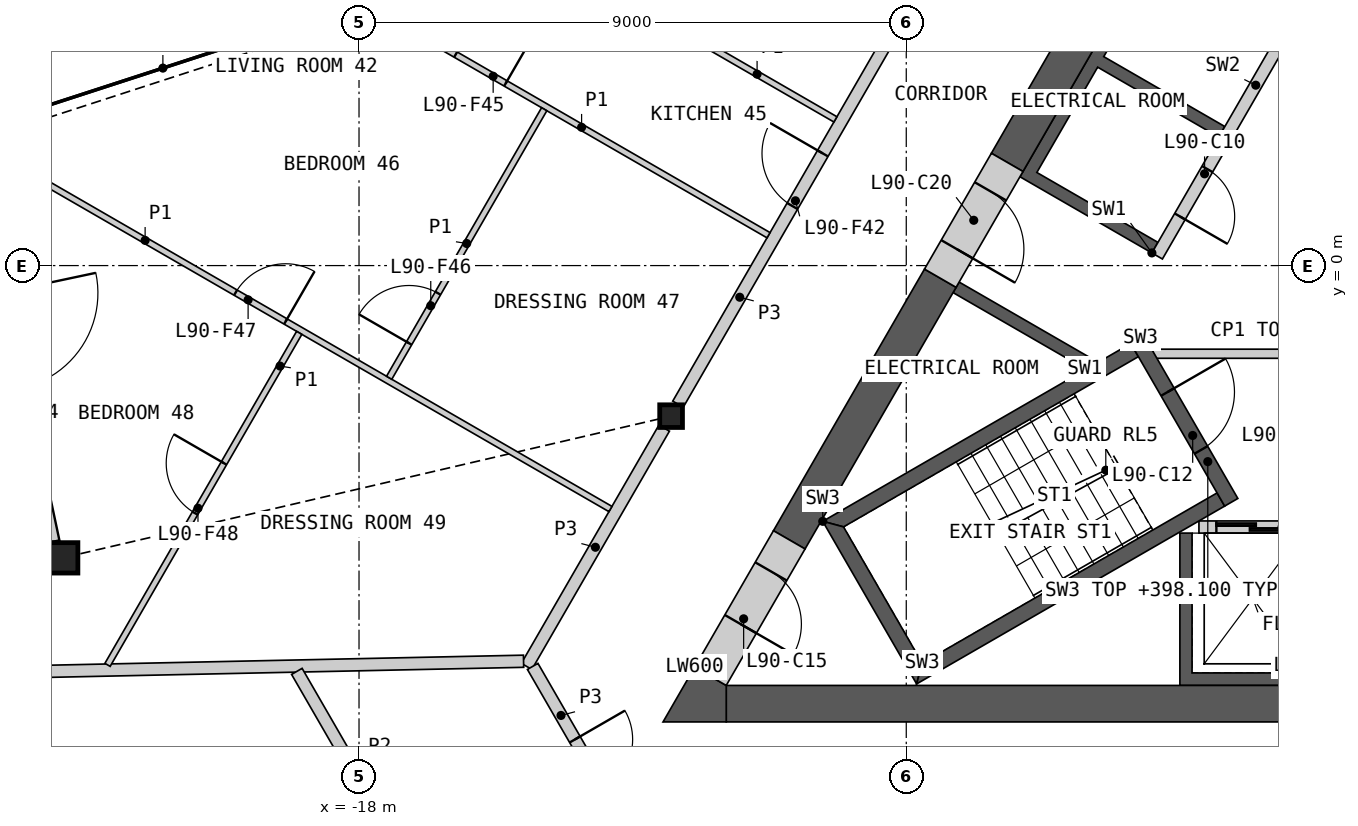
"""IFC4 building model, lengths in metres.
Left out: names, types, materials, properties, quantities, classifications, styles, units other than length and angle.
Written with IfcOpenShell. Run it as: python <this file> out.ifc"""

import sys

from ifc_helpers import new_model, si_unit, direction, frame, frame_2d, origin, origin_2d, place, context, subcontext, project, spatial, polyline, rectangle, hollow_rectangle, i_section, outline, extrude, element, fill, save


model = new_model("IFC4")
c1 = context("Model", 3, precision=1e-05, world=origin(), true_north=direction((0.0, 1.0)))
c2 = subcontext(c1, "Body", "Model", "MODEL_VIEW")
j1 = project(units=[si_unit("LENGTHUNIT", "METRE"), si_unit("PLANEANGLEUNIT", "RADIAN")], contexts=[c1])
p1 = place(None, origin())
s1 = spatial("IfcSite", under=j1, at=p1, CompositionType="ELEMENT")
p2 = place(p1, origin())
s2 = spatial("IfcBuilding", under=s1, at=p2, CompositionType="ELEMENT")
p3 = place(p2, frame((0.0, 0.0, 395.0)))
s3 = spatial("IfcBuildingStorey", under=s2, at=p3, CompositionType="ELEMENT", Elevation=395.0)
p4 = place(p3, frame((-22.874, -4.807, 0.0), z_axis=(0.0, 0.0, 1.0), x_axis=(1.0, 0.0, 0.0)))
e1 = element("IfcColumn", 1, at=p4, inside=s3, PredefinedType="COLUMN", context=c2, shape_type="SweptSolid", body=[
    extrude(hollow_rectangle(XDim=0.5, YDim=0.5, WallThickness=0.03, at=origin_2d()), origin(), (0.0, 0.0, 1.0), 3.4),
])
p5 = place(p3, frame((-12.868, -2.476, 0.0), z_axis=(0.0, 0.0, 1.0), x_axis=(1.0, 0.0, 0.0)))
e2 = element("IfcColumn", 2, at=p5, inside=s3, PredefinedType="COLUMN", context=c2, shape_type="SweptSolid", body=[
    extrude(i_section(OverallWidth=0.374, OverallDepth=0.372, WebThickness=0.016, FlangeThickness=0.026, at=origin_2d()), origin(), (0.0, 0.0, 1.0), 3.4),
])
p6 = place(p3, frame((-24.379, 1.83, 0.0), z_axis=(0.0, 0.0, 1.0), x_axis=(0.207910765171, -0.978147797486, 0.0)))
e3 = element("IfcWall", 3, at=p6, inside=s3, PredefinedType="SOLIDWALL", context=c2, shape_type="SweptSolid", body=[
    extrude(rectangle(XDim=6.512, YDim=0.2, at=frame_2d((3.256, 0.0))), origin(), (0.0, 0.0, 1.0), 2.634),
])
p7 = place(p6, frame((2.333, 0.0, 0.0)))
e4 = element("IfcOpeningElement", 4, at=p7, cuts=e3, PredefinedType="OPENING", context=c2, shape_type="SweptSolid", body=[
    extrude(rectangle(XDim=1.6, YDim=2.25, at=frame_2d((0.8, 1.125))), frame((0.0, 0.11, 0.0), z_axis=(0.0, -1.0, 0.0), x_axis=(1.0, 0.0, 0.0)), (0.0, 0.0, 1.0), 0.22),
])
p8 = place(p3, origin())
e5 = element("IfcWall", 5, at=p8, inside=s3, PredefinedType="SHEAR", context=c2, shape_type="SweptSolid", body=[
    extrude(outline(polyline([(4.5, -4.4), (4.5, -6.906), (-4.5, -6.906), (-4.5, -4.4), (-4.3, -4.4), (-4.3, -6.7), (-2.3, -6.7), (-2.3, -4.4), (-2.1, -4.4), (-2.1, -6.7), (-0.1, -6.7), (-0.1, -4.4), (0.1, -4.4), (0.1, -6.7), (2.1, -6.7), (2.1, -4.4), (2.3, -4.4), (2.3, -6.7), (4.3, -6.7), (4.3, -4.4), (4.5, -4.4)])), origin(), (0.0, 0.0, 1.0), 3.1),
])
p9 = place(p3, frame((-4.187, -4.3, 0.0), z_axis=(0.0, 0.0, 1.0), x_axis=(1.0, 0.0, 0.0)))
e6 = element("IfcWall", 6, at=p9, inside=s3, PredefinedType="SOLIDWALL", context=c2, shape_type="SweptSolid", body=[
    extrude(rectangle(XDim=8.373, YDim=0.2, at=frame_2d((4.187, 0.0))), origin(), (0.0, 0.0, 1.0), 3.1),
])
p10 = place(p9, frame((0.287, 0.0, 0.0)))
e7 = element("IfcOpeningElement", 7, at=p10, cuts=e6, PredefinedType="OPENING", context=c2, shape_type="SweptSolid", body=[
    extrude(rectangle(XDim=1.2, YDim=2.1, at=frame_2d((0.6, 1.05))), frame((0.0, 0.11, 0.0), z_axis=(0.0, -1.0, 0.0), x_axis=(1.0, 0.0, 0.0)), (0.0, 0.0, 1.0), 0.22),
])
p11 = place(p9, frame((2.387, 0.0, 0.0)))
e8 = element("IfcOpeningElement", 8, at=p11, cuts=e6, PredefinedType="OPENING", context=c2, shape_type="SweptSolid", body=[
    extrude(rectangle(XDim=1.4, YDim=2.1, at=frame_2d((0.7, 1.05))), frame((0.0, 0.11, 0.0), z_axis=(0.0, -1.0, 0.0), x_axis=(1.0, 0.0, 0.0)), (0.0, 0.0, 1.0), 0.22),
])
p12 = place(p9, frame((4.737, 0.0, 0.0)))
e9 = element("IfcOpeningElement", 9, at=p12, cuts=e6, PredefinedType="OPENING", context=c2, shape_type="SweptSolid", body=[
    extrude(rectangle(XDim=1.1, YDim=2.1, at=frame_2d((0.55, 1.05))), frame((0.0, 0.11, 0.0), z_axis=(0.0, -1.0, 0.0), x_axis=(1.0, 0.0, 0.0)), (0.0, 0.0, 1.0), 0.22),
])
p13 = place(p9, frame((6.887, 0.0, 0.0)))
e10 = element("IfcOpeningElement", 10, at=p13, cuts=e6, PredefinedType="OPENING", context=c2, shape_type="SweptSolid", body=[
    extrude(rectangle(XDim=1.2, YDim=2.1, at=frame_2d((0.6, 1.05))), frame((0.0, 0.11, 0.0), z_axis=(0.0, -1.0, 0.0), x_axis=(1.0, 0.0, 0.0)), (0.0, 0.0, 1.0), 0.22),
])
p14 = place(p3, origin())
e11 = element("IfcWall", 11, at=p14, inside=s3, PredefinedType="SHEAR", context=c2, shape_type="SweptSolid", body=[
    extrude(outline(polyline([(-6.061, -1.697), (-8.231, -0.444), (-8.131, -0.271), (-5.96, -1.524), (-6.061, -1.697)])), origin(), (0.0, 0.0, 1.0), 3.1),
])
p15 = place(p3, origin())
e12 = element("IfcWall", 12, at=p15, inside=s3, PredefinedType="SHEAR", context=c2, shape_type="SweptSolid", body=[
    extrude(outline(polyline([(-4.96, 0.208), (-7.131, 1.461), (-3.731, 7.35), (-1.561, 6.097), (-1.66, 5.924), (-3.652, 7.074), (-5.752, 3.437), (-3.76, 2.287), (-3.861, 2.113), (-5.852, 3.263), (-6.852, 1.531), (-4.861, 0.381), (-4.96, 0.208)])), origin(), (0.0, 0.0, 1.0), 3.1),
])
p16 = place(p3, frame((-1.631, 5.776, 0.0), z_axis=(0.0, 0.0, 1.0), x_axis=(-0.499992876559, -0.866029516466, 0.0)))
e13 = element("IfcWall", 13, at=p16, inside=s3, PredefinedType="SOLIDWALL", context=c2, shape_type="SweptSolid", body=[
    extrude(rectangle(XDim=6.486, YDim=0.2, at=frame_2d((3.243, 0.0))), origin(), (0.0, 0.0, 1.0), 3.1),
])
p17 = place(p16, frame((1.537, 0.0, 0.0)))
e14 = element("IfcOpeningElement", 14, at=p17, cuts=e13, PredefinedType="OPENING", context=c2, shape_type="SweptSolid", body=[
    extrude(rectangle(XDim=0.9, YDim=2.1, at=frame_2d((0.45, 1.05))), frame((0.0, 0.11, 0.0), z_axis=(0.0, -1.0, 0.0), x_axis=(1.0, 0.0, 0.0)), (0.0, 0.0, 1.0), 0.22),
])
p18 = place(p16, frame((4.837, 0.0, 0.0)))
e15 = element("IfcOpeningElement", 15, at=p18, cuts=e13, PredefinedType="OPENING", context=c2, shape_type="SweptSolid", body=[
    extrude(rectangle(XDim=0.9, YDim=2.1, at=frame_2d((0.45, 1.05))), frame((0.0, 0.11, 0.0), z_axis=(0.0, -1.0, 0.0), x_axis=(1.0, 0.0, 0.0)), (0.0, 0.0, 1.0), 0.22),
])
p19 = place(p3, frame((-4.941, -1.45, 0.0), z_axis=(0.0, 0.0, 1.0), x_axis=(1.0, 0.0, 0.0)))
e16 = element("IfcWall", 16, at=p19, inside=s3, PredefinedType="PARTITIONING", context=c2, shape_type="SweptSolid", body=[
    extrude(rectangle(XDim=9.882, YDim=0.15, at=frame_2d((4.941, 0.0))), origin(), (0.0, 0.0, 1.0), 3.1),
])
p20 = place(p19, frame((4.391, 0.0, 0.0)))
e17 = element("IfcOpeningElement", 17, at=p20, cuts=e16, PredefinedType="OPENING", context=c2, shape_type="SweptSolid", body=[
    extrude(rectangle(XDim=1.1, YDim=2.1, at=frame_2d((0.55, 1.05))), frame((0.0, 0.085, 0.0), z_axis=(0.0, -1.0, 0.0), x_axis=(1.0, 0.0, 0.0)), (0.0, 0.0, 1.0), 0.17),
])
p21 = place(p3, origin())
e18 = element("IfcWall", 18, at=p21, inside=s3, PredefinedType="SHEAR", context=c2, shape_type="SweptSolid", body=[
    extrude(outline(polyline([(-5.307, -1.281), (-10.374, -4.206), (-10.032, -4.298), (-5.182, -1.498), (-5.307, -1.281)])), origin(), (0.0, 0.0, 1.0), 3.1),
])
p22 = place(p3, origin())
e19 = element("IfcWall", 19, at=p22, inside=s3, PredefinedType="SHEAR", context=c2, shape_type="SweptSolid", body=[
    extrude(outline(polyline([(-10.374, -4.206), (-8.83, -6.881), (-8.738, -6.539), (-10.032, -4.298), (-10.374, -4.206)])), origin(), (0.0, 0.0, 1.0), 3.1),
])
p23 = place(p3, origin())
e20 = element("IfcWall", 20, at=p23, inside=s3, PredefinedType="SHEAR", context=c2, shape_type="SweptSolid", body=[
    extrude(outline(polyline([(-8.738, -6.539), (-8.83, -6.881), (-3.763, -3.956), (-3.888, -3.739), (-8.738, -6.539)])), origin(), (0.0, 0.0, 1.0), 3.1),
])
p24 = place(p3, frame((-5.199, -1.219, 0.0), z_axis=(0.0, 0.0, 1.0), x_axis=(0.499982516597, -0.866035497597, 0.0)))
e21 = element("IfcWall", 21, at=p24, inside=s3, PredefinedType="SHEAR", context=c2, shape_type="SweptSolid", body=[
    extrude(rectangle(XDim=3.088, YDim=0.25, at=frame_2d((1.544, 0.0))), origin(), (0.0, 0.0, 1.0), 3.1),
])
p25 = place(p24, frame((0.994, 0.0, 0.0)))
e22 = element("IfcOpeningElement", 22, at=p25, cuts=e21, PredefinedType="OPENING", context=c2, shape_type="SweptSolid", body=[
    extrude(rectangle(XDim=1.1, YDim=2.1, at=frame_2d((0.55, 1.05))), frame((0.0, 0.135, 0.0), z_axis=(0.0, -1.0, 0.0), x_axis=(1.0, 0.0, 0.0)), (0.0, 0.0, 1.0), 0.27),
])
p26 = place(p3, frame((-11.961, -7.206, 0.0), z_axis=(0.0, 0.0, 1.0), x_axis=(1.0, 0.0, 0.0)))
e23 = element("IfcWall", 23, at=p26, inside=s3, PredefinedType="SHEAR", context=c2, shape_type="SweptSolid", body=[
    extrude(rectangle(XDim=23.921, YDim=0.6, at=frame_2d((11.961, 0.0))), origin(), (0.0, 0.0, 1.0), 3.1),
])
p27 = place(p3, frame((-3.461, 8.417, 0.0), z_axis=(0.0, 0.0, 1.0), x_axis=(-0.50000391502, -0.866023143435, 0.0)))
e24 = element("IfcWall", 24, at=p27, inside=s3, PredefinedType="SHEAR", context=c2, shape_type="SweptSolid", body=[
    extrude(rectangle(XDim=7.759, YDim=0.6, at=frame_2d((3.879, 0.0))), origin(), (0.0, 0.0, 1.0), 3.1),
])
p28 = place(p3, frame((-8.44, -0.208, 0.0), z_axis=(0.0, 0.0, 1.0), x_axis=(-0.500007425856, -0.866021116422, 0.0)))
e25 = element("IfcWall", 25, at=p28, inside=s3, PredefinedType="SHEAR", context=c2, shape_type="SweptSolid", body=[
    extrude(rectangle(XDim=4.969, YDim=0.6, at=frame_2d((2.484, 0.0))), origin(), (0.0, 0.0, 1.0), 3.1),
])
p29 = place(p3, origin())
e26 = element("IfcWall", 26, at=p29, inside=s3, PredefinedType="SHEAR", context=c2, shape_type="SweptSolid", body=[
    extrude(outline(polyline([(-12.48, -6.606), (-11.961, -6.906), (-11.961, -7.506), (-13.0, -7.506), (-12.48, -6.606)])), origin(), (0.0, 0.0, 1.0), 3.1),
])
p30 = place(p3, frame((-10.925, -4.511, 0.0), z_axis=(0.0, 0.0, 1.0), x_axis=(-0.500018667571, -0.866014625789, 0.0)))
e27 = element("IfcWall", 27, at=p30, inside=s3, PredefinedType="SHEAR", context=c2, shape_type="SweptSolid", body=[
    extrude(rectangle(XDim=2.592, YDim=0.6, at=frame_2d((1.296, 0.0))), origin(), (0.0, 0.0, 1.0), 3.1),
])
p31 = place(p30, frame((0.6, 0.0, 0.0)))
e28 = element("IfcOpeningElement", 28, at=p31, cuts=e27, PredefinedType="OPENING", context=c2, shape_type="SweptSolid", body=[
    extrude(rectangle(XDim=1.0, YDim=2.1, at=frame_2d((0.5, 1.05))), frame((0.0, 0.31, 0.0), z_axis=(0.0, -1.0, 0.0), x_axis=(1.0, 0.0, 0.0)), (0.0, 0.0, 1.0), 0.62),
])
p32 = place(p3, frame((-7.34, 1.698, 0.0), z_axis=(0.0, 0.0, 1.0), x_axis=(-0.50002983664, -0.866008176907, 0.0)))
e29 = element("IfcWall", 29, at=p32, inside=s3, PredefinedType="SHEAR", context=c2, shape_type="SweptSolid", body=[
    extrude(rectangle(XDim=2.2, YDim=0.6, at=frame_2d((1.1, 0.0))), origin(), (0.0, 0.0, 1.0), 3.1),
])
p33 = place(p32, frame((0.55, 0.0, 0.0)))
e30 = element("IfcOpeningElement", 30, at=p33, cuts=e29, PredefinedType="OPENING", context=c2, shape_type="SweptSolid", body=[
    extrude(rectangle(XDim=1.1, YDim=2.1, at=frame_2d((0.55, 1.05))), frame((0.0, 0.31, 0.0), z_axis=(0.0, -1.0, 0.0), x_axis=(1.0, 0.0, 0.0)), (0.0, 0.0, 1.0), 0.62),
])
p34 = place(p3, frame((-12.754, -2.279, 0.0), z_axis=(0.0, 0.0, 1.0), x_axis=(0.500001682468, 0.866024432409, 0.0)))
e31 = element("IfcWall", 31, at=p34, inside=s3, PredefinedType="PARTITIONING", context=c2, shape_type="SweptSolid", body=[
    extrude(rectangle(XDim=8.124, YDim=0.2, at=frame_2d((4.062, 0.0))), origin(), (0.0, 0.0, 1.0), 3.1),
])
p35 = place(p34, frame((3.762, 0.0, 0.0)))
e32 = element("IfcOpeningElement", 32, at=p35, cuts=e31, PredefinedType="OPENING", context=c2, shape_type="SweptSolid", body=[
    extrude(rectangle(XDim=1.0, YDim=2.1, at=frame_2d((0.5, 1.05))), frame((0.0, 0.11, 0.0), z_axis=(0.0, -1.0, 0.0), x_axis=(1.0, 0.0, 0.0)), (0.0, 0.0, 1.0), 0.22),
])
p36 = place(p3, frame((-15.244, -6.592, 0.0), z_axis=(0.0, 0.0, 1.0), x_axis=(0.499974648164, 0.866040040179, 0.0)))
e33 = element("IfcWall", 33, at=p36, inside=s3, PredefinedType="PARTITIONING", context=c2, shape_type="SweptSolid", body=[
    extrude(rectangle(XDim=4.525, YDim=0.2, at=frame_2d((2.263, 0.0))), origin(), (0.0, 0.0, 1.0), 3.1),
])
p37 = place(p3, frame((-15.144, -6.592, 0.0), z_axis=(0.0, 0.0, 1.0), x_axis=(0.499958791762, -0.866049194065, 0.0)))
e34 = element("IfcWall", 34, at=p37, inside=s3, PredefinedType="PARTITIONING", context=c2, shape_type="SweptSolid", body=[
    extrude(rectangle(XDim=3.726, YDim=0.2, at=frame_2d((1.863, 0.0))), origin(), (0.0, 0.0, 1.0), 3.1),
])
p38 = place(p37, frame((1.388, 0.0, 0.0)))
e35 = element("IfcOpeningElement", 35, at=p38, cuts=e34, PredefinedType="OPENING", context=c2, shape_type="SweptSolid", body=[
    extrude(rectangle(XDim=0.95, YDim=2.1, at=frame_2d((0.475, 1.05))), frame((0.0, 0.11, 0.0), z_axis=(0.0, -1.0, 0.0), x_axis=(1.0, 0.0, 0.0)), (0.0, 0.0, 1.0), 0.22),
])
p39 = place(p3, frame((-29.269, -6.804, 0.0), z_axis=(0.0, 0.0, 1.0), x_axis=(0.999775536303, 0.021186717777, 0.0)))
e36 = element("IfcWall", 36, at=p39, inside=s3, PredefinedType="PARTITIONING", context=c2, shape_type="SweptSolid", body=[
    extrude(rectangle(XDim=13.978, YDim=0.2, at=frame_2d((6.989, 0.0))), origin(), (0.0, 0.0, 1.0), 2.33),
])
p40 = place(p3, frame((-19.022, -6.674, 0.0), z_axis=(0.0, 0.0, 1.0), x_axis=(0.499983843005, -0.866034731829, 0.0)))
e37 = element("IfcWall", 37, at=p40, inside=s3, PredefinedType="PARTITIONING", context=c2, shape_type="SweptSolid", body=[
    extrude(rectangle(XDim=3.503, YDim=0.2, at=frame_2d((1.752, 0.0))), origin(), (0.0, 0.0, 1.0), 2.33),
])
p41 = place(p3, frame((-24.069, 1.887, 0.0), z_axis=(0.0, 0.0, 1.0), x_axis=(0.866023404247, -0.500003463284, 0.0)))
e38 = element("IfcWall", 38, at=p41, inside=s3, PredefinedType="PARTITIONING", context=c2, shape_type="SweptSolid", body=[
    extrude(rectangle(XDim=11.782, YDim=0.1, at=frame_2d((5.891, 0.0))), origin(), (0.0, 0.0, 1.0), 2.33),
])
p42 = place(p41, frame((4.664, 0.0, 0.0)))
e39 = element("IfcOpeningElement", 39, at=p42, cuts=e38, PredefinedType="OPENING", context=c2, shape_type="SweptSolid", body=[
    extrude(rectangle(XDim=0.95, YDim=2.1, at=frame_2d((0.475, 1.05))), frame((0.0, 0.06, 0.0), z_axis=(0.0, -1.0, 0.0), x_axis=(1.0, 0.0, 0.0)), (0.0, 0.0, 1.0), 0.12),
])
p43 = place(p3, frame((-17.414, 4.049, 0.0), z_axis=(0.0, 0.0, 1.0), x_axis=(0.866033839264, -0.499985389037, 0.0)))
e40 = element("IfcWall", 40, at=p43, inside=s3, PredefinedType="PARTITIONING", context=c2, shape_type="SweptSolid", body=[
    extrude(rectangle(XDim=7.1, YDim=0.1, at=frame_2d((3.55, 0.0))), origin(), (0.0, 0.0, 1.0), 2.33),
])
p44 = place(p43, frame((1.158, 0.0, 0.0)))
e41 = element("IfcOpeningElement", 41, at=p44, cuts=e40, PredefinedType="OPENING", context=c2, shape_type="SweptSolid", body=[
    extrude(rectangle(XDim=0.95, YDim=2.1, at=frame_2d((0.475, 1.05))), frame((0.0, 0.06, 0.0), z_axis=(0.0, -1.0, 0.0), x_axis=(1.0, 0.0, 0.0)), (0.0, 0.0, 1.0), 0.12),
])
p45 = place(p3, frame((-22.136, -6.567, 0.0), z_axis=(0.0, 0.0, 1.0), x_axis=(0.500016298831, 0.866015993445, 0.0)))
e42 = element("IfcWall", 42, at=p45, inside=s3, PredefinedType="PARTITIONING", context=c2, shape_type="SweptSolid", body=[
    extrude(rectangle(XDim=6.305, YDim=0.1, at=frame_2d((3.152, 0.0))), origin(), (0.0, 0.0, 1.0), 2.33),
])
p46 = place(p45, frame((2.88, 0.0, 0.0)))
e43 = element("IfcOpeningElement", 43, at=p46, cuts=e42, PredefinedType="OPENING", context=c2, shape_type="SweptSolid", body=[
    extrude(rectangle(XDim=0.95, YDim=2.1, at=frame_2d((0.475, 1.05))), frame((0.0, 0.06, 0.0), z_axis=(0.0, -1.0, 0.0), x_axis=(1.0, 0.0, 0.0)), (0.0, 0.0, 1.0), 0.12),
])
p47 = place(p3, frame((-15.318, 5.38, 0.0), z_axis=(0.0, 0.0, 1.0), x_axis=(0.866035260786, -0.499982926783, 0.0)))
e44 = element("IfcWall", 44, at=p47, inside=s3, PredefinedType="PARTITIONING", context=c2, shape_type="SweptSolid", body=[
    extrude(rectangle(XDim=5.95, YDim=0.1, at=frame_2d((2.975, 0.0))), origin(), (0.0, 0.0, 1.0), 2.33),
])
p48 = place(p3, frame((-17.504, -1.845, 0.0), z_axis=(0.0, 0.0, 1.0), x_axis=(0.499984882974, 0.866034131428, 0.0)))
e45 = element("IfcWall", 45, at=p48, inside=s3, PredefinedType="PARTITIONING", context=c2, shape_type="SweptSolid", body=[
    extrude(rectangle(XDim=5.1, YDim=0.1, at=frame_2d((2.55, 0.0))), origin(), (0.0, 0.0, 1.0), 2.33),
])
p49 = place(p48, frame((0.656, 0.0, 0.0)))
e46 = element("IfcOpeningElement", 46, at=p49, cuts=e45, PredefinedType="OPENING", context=c2, shape_type="SweptSolid", body=[
    extrude(rectangle(XDim=0.95, YDim=2.1, at=frame_2d((0.475, 1.05))), frame((0.0, 0.06, 0.0), z_axis=(0.0, -1.0, 0.0), x_axis=(1.0, 0.0, 0.0)), (0.0, 0.0, 1.0), 0.12),
])
p50 = place(p10, origin())
e47 = element("IfcDoor", 47, at=p50, inside=s3, OperationType="SLIDING_TO_LEFT", PredefinedType="DOOR", context=c2, shape_type="SweptSolid", body=[
    extrude(rectangle(XDim=1.2, YDim=2.1, at=frame_2d((0.6, 1.05))), frame((0.0, 0.025, 0.0), z_axis=(0.0, -1.0, 0.0), x_axis=(1.0, 0.0, 0.0)), (0.0, 0.0, 1.0), 0.05),
])
fill(e7, e47)
p51 = place(p18, origin())
e48 = element("IfcDoor", 48, at=p51, inside=s3, OperationType="SINGLE_SWING_RIGHT", PredefinedType="DOOR", context=c2, shape_type="SweptSolid", body=[
    extrude(rectangle(XDim=0.9, YDim=2.1, at=frame_2d((0.45, 1.05))), frame((0.0, 0.025, 0.0), z_axis=(0.0, -1.0, 0.0), x_axis=(1.0, 0.0, 0.0)), (0.0, 0.0, 1.0), 0.05),
])
fill(e15, e48)
p52 = place(p25, origin())
e49 = element("IfcDoor", 49, at=p52, inside=s3, OperationType="SINGLE_SWING_LEFT", PredefinedType="DOOR", context=c2, shape_type="SweptSolid", body=[
    extrude(rectangle(XDim=1.1, YDim=2.1, at=frame_2d((0.55, 1.05))), frame((0.0, 0.025, 0.0), z_axis=(0.0, -1.0, 0.0), x_axis=(1.0, 0.0, 0.0)), (0.0, 0.0, 1.0), 0.05),
])
fill(e22, e49)
p53 = place(p31, origin())
e50 = element("IfcDoor", 50, at=p53, inside=s3, OperationType="SINGLE_SWING_RIGHT", PredefinedType="DOOR", context=c2, shape_type="SweptSolid", body=[
    extrude(rectangle(XDim=1.0, YDim=2.1, at=frame_2d((0.5, 1.05))), frame((0.0, 0.055, 0.0), z_axis=(0.0, -1.0, 0.0), x_axis=(1.0, 0.0, 0.0)), (0.0, 0.0, 1.0), 0.05),
])
fill(e28, e50)
p54 = place(p33, origin())
e51 = element("IfcDoor", 51, at=p54, inside=s3, OperationType="SINGLE_SWING_RIGHT", PredefinedType="DOOR", context=c2, shape_type="SweptSolid", body=[
    extrude(rectangle(XDim=1.1, YDim=2.1, at=frame_2d((0.55, 1.05))), frame((0.0, 0.055, 0.0), z_axis=(0.0, -1.0, 0.0), x_axis=(1.0, 0.0, 0.0)), (0.0, 0.0, 1.0), 0.05),
])
fill(e30, e51)
p55 = place(p35, origin())
e52 = element("IfcDoor", 52, at=p55, inside=s3, OperationType="SINGLE_SWING_RIGHT", PredefinedType="DOOR", context=c2, shape_type="SweptSolid", body=[
    extrude(rectangle(XDim=1.0, YDim=2.1, at=frame_2d((0.5, 1.05))), frame((0.0, 0.025, 0.0), z_axis=(0.0, -1.0, 0.0), x_axis=(1.0, 0.0, 0.0)), (0.0, 0.0, 1.0), 0.05),
])
fill(e32, e52)
p56 = place(p44, origin())
e53 = element("IfcDoor", 53, at=p56, inside=s3, OperationType="SINGLE_SWING_RIGHT", PredefinedType="DOOR", context=c2, shape_type="SweptSolid", body=[
    extrude(rectangle(XDim=0.95, YDim=2.1, at=frame_2d((0.475, 1.05))), frame((0.0, 0.025, 0.0), z_axis=(0.0, -1.0, 0.0), x_axis=(1.0, 0.0, 0.0)), (0.0, 0.0, 1.0), 0.05),
])
fill(e41, e53)
p57 = place(p49, origin())
e54 = element("IfcDoor", 54, at=p57, inside=s3, OperationType="SINGLE_SWING_LEFT", PredefinedType="DOOR", context=c2, shape_type="SweptSolid", body=[
    extrude(rectangle(XDim=0.95, YDim=2.1, at=frame_2d((0.475, 1.05))), frame((0.0, 0.025, 0.0), z_axis=(0.0, -1.0, 0.0), x_axis=(1.0, 0.0, 0.0)), (0.0, 0.0, 1.0), 0.05),
])
fill(e46, e54)
p58 = place(p42, origin())
e55 = element("IfcDoor", 55, at=p58, inside=s3, OperationType="SINGLE_SWING_RIGHT", PredefinedType="DOOR", context=c2, shape_type="SweptSolid", body=[
    extrude(rectangle(XDim=0.95, YDim=2.1, at=frame_2d((0.475, 1.05))), frame((0.0, 0.025, 0.0), z_axis=(0.0, -1.0, 0.0), x_axis=(1.0, 0.0, 0.0)), (0.0, 0.0, 1.0), 0.05),
])
fill(e39, e55)
p59 = place(p46, origin())
e56 = element("IfcDoor", 56, at=p59, inside=s3, OperationType="SINGLE_SWING_RIGHT", PredefinedType="DOOR", context=c2, shape_type="SweptSolid", body=[
    extrude(rectangle(XDim=0.95, YDim=2.1, at=frame_2d((0.475, 1.05))), frame((0.0, 0.025, 0.0), z_axis=(0.0, -1.0, 0.0), x_axis=(1.0, 0.0, 0.0)), (0.0, 0.0, 1.0), 0.05),
])
fill(e43, e56)
p60 = place(p38, origin())
e57 = element("IfcDoor", 57, at=p60, inside=s3, OperationType="SINGLE_SWING_LEFT", PredefinedType="DOOR", context=c2, shape_type="SweptSolid", body=[
    extrude(rectangle(XDim=0.95, YDim=2.1, at=frame_2d((0.475, 1.05))), frame((0.0, 0.025, 0.0), z_axis=(0.0, -1.0, 0.0), x_axis=(1.0, 0.0, 0.0)), (0.0, 0.0, 1.0), 0.05),
])
fill(e35, e57)
save(model, sys.argv[1])
